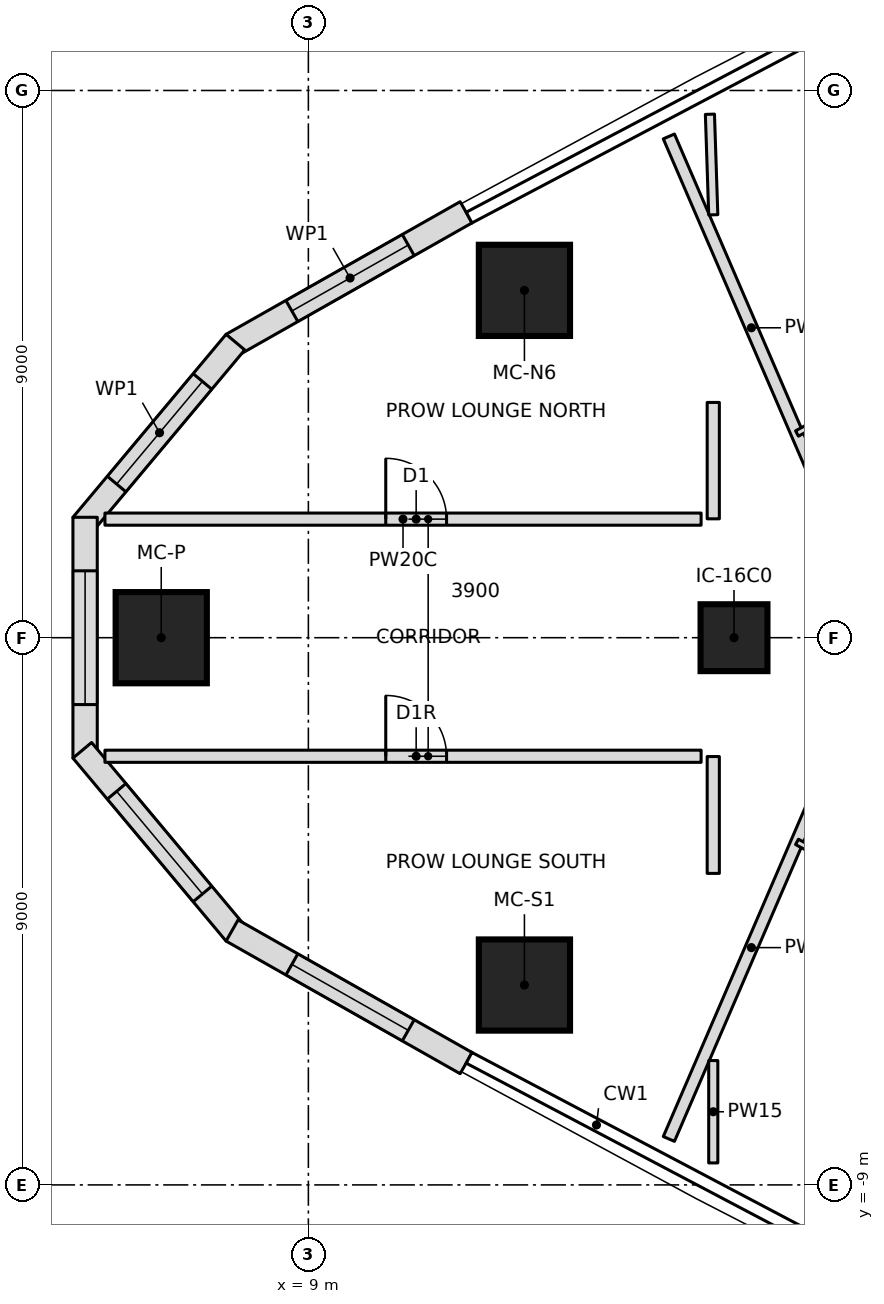
"""IFC4 building model, lengths in metres.
Left out: names, types, materials, properties, quantities, classifications, styles, units other than length and angle.
Written with IfcOpenShell. Run it as: python <this file> out.ifc"""

import sys

from ifc_helpers import new_model, si_unit, direction, frame, frame_2d, origin, origin_2d, place, context, subcontext, project, spatial, polyline, rectangle, outline, extrude, element, fill, save


model = new_model("IFC4")
c1 = context("Model", 3, precision=1e-05, world=origin(), true_north=direction((0.0, 1.0)))
c2 = subcontext(c1, "Body", "Model", "MODEL_VIEW")
j1 = project(units=[si_unit("LENGTHUNIT", "METRE"), si_unit("PLANEANGLEUNIT", "RADIAN")], contexts=[c1])
p1 = place(None, origin())
s1 = spatial("IfcSite", under=j1, at=p1, CompositionType="ELEMENT")
p2 = place(p1, origin())
s2 = spatial("IfcBuilding", under=s1, at=p2, CompositionType="ELEMENT")
p3 = place(p2, frame((0.0, 0.0, 133.75)))
s3 = spatial("IfcBuildingStorey", under=s2, at=p3, CompositionType="ELEMENT", Elevation=133.75)
for number, where, z_axis, x_axis in (
    (1, (6.58, 0.0, 0.0), (0.0, 0.0, 1.0), (1.0, 0.0, 0.0)),
    (2, (12.553, -5.713, 0.0), (0.0, 0.0, 1.0), (1.0, 0.0, 0.0)),
    (3, (12.553, 5.713, 0.0), (0.0, 0.0, 1.0), (1.0, 0.0, 0.0)),
):
    element("IfcColumn", number, at=place(p3, frame(where, z_axis=z_axis, x_axis=x_axis)), inside=s3, PredefinedType="COLUMN", context=c2, shape_type="SweptSolid", body=[
        extrude(rectangle(XDim=1.5, YDim=1.5, at=origin_2d()), origin(), (0.0, 0.0, 1.0), 3.55),
    ])
p4 = place(p3, frame((16.0, 0.0, 0.0), z_axis=(0.0, 0.0, 1.0), x_axis=(1.0, 0.0, 0.0)))
e4 = element("IfcColumn", 4, at=p4, inside=s3, PredefinedType="COLUMN", context=c2, shape_type="SweptSolid", body=[
    extrude(rectangle(XDim=1.1, YDim=1.1, at=origin_2d()), origin(), (0.0, 0.0, 1.0), 3.55),
])
p5 = place(p3, frame((11.594, 6.997, 0.0), z_axis=(0.0, 0.0, 1.0), x_axis=(-0.870045255208, -0.492971859125, 0.0)))
e5 = element("IfcWall", 5, at=p5, inside=s3, PredefinedType="NOTDEFINED", context=c2, shape_type="SweptSolid", body=[
    extrude(outline(polyline([(0.0, -0.2), (4.424, -0.2), (4.352, 0.2), (0.0, 0.2), (0.0, -0.2)])), origin(), (0.0, 0.0, 1.0), 3.25),
])
p6 = place(p5, frame((1.094, 0.0, 0.6)))
e6 = element("IfcOpeningElement", 6, at=p6, cuts=e5, PredefinedType="OPENING", context=c2, shape_type="SweptSolid", body=[
    extrude(outline(polyline([(0.0, 1.35), (0.084, 1.771), (0.322, 2.128), (0.679, 2.366), (1.1, 2.45), (1.521, 2.366), (1.878, 2.128), (2.116, 1.771), (2.2, 1.35), (2.2, 1.1), (2.116, 0.679), (1.878, 0.322), (1.521, 0.084), (1.1, 0.0), (0.679, 0.084), (0.322, 0.322), (0.084, 0.679), (0.0, 1.1), (0.0, 1.35)])), frame((0.0, 0.21, 0.0), z_axis=(0.0, -1.0, 0.0), x_axis=(1.0, 0.0, 0.0)), (0.0, 0.0, 1.0), 0.42),
])
p7 = place(p3, frame((7.777, 4.834, 0.0), z_axis=(0.0, 0.0, 1.0), x_axis=(-0.641787918235, -0.766882173484, 0.0)))
e7 = element("IfcWall", 7, at=p7, inside=s3, PredefinedType="NOTDEFINED", context=c2, shape_type="SweptSolid", body=[
    extrude(outline(polyline([(-0.036, -0.2), (3.888, -0.2), (3.743, 0.2), (0.036, 0.2), (-0.036, -0.2)])), origin(), (0.0, 0.0, 1.0), 3.25),
])
p8 = place(p7, frame((0.808, 0.0, 0.6)))
e8 = element("IfcOpeningElement", 8, at=p8, cuts=e7, PredefinedType="OPENING", context=c2, shape_type="SweptSolid", body=[
    extrude(outline(polyline([(0.0, 1.35), (0.084, 1.771), (0.322, 2.128), (0.679, 2.366), (1.1, 2.45), (1.521, 2.366), (1.878, 2.128), (2.116, 1.771), (2.2, 1.35), (2.2, 1.1), (2.116, 0.679), (1.878, 0.322), (1.521, 0.084), (1.1, 0.0), (0.679, 0.084), (0.322, 0.322), (0.084, 0.679), (0.0, 1.1), (0.0, 1.35)])), frame((0.0, 0.21, 0.0), z_axis=(0.0, -1.0, 0.0), x_axis=(1.0, 0.0, 0.0)), (0.0, 0.0, 1.0), 0.42),
])
p9 = place(p3, frame((5.328, 1.908, 0.0), z_axis=(0.0, 0.0, 1.0), x_axis=(0.0, -1.0, 0.0)))
e9 = element("IfcWall", 9, at=p9, inside=s3, PredefinedType="NOTDEFINED", context=c2, shape_type="SweptSolid", body=[
    extrude(outline(polyline([(-0.073, -0.2), (3.888, -0.2), (3.743, 0.2), (0.073, 0.2), (-0.073, -0.2)])), origin(), (0.0, 0.0, 1.0), 3.25),
])
p10 = place(p9, frame((0.808, 0.0, 0.6)))
e10 = element("IfcOpeningElement", 10, at=p10, cuts=e9, PredefinedType="OPENING", context=c2, shape_type="SweptSolid", body=[
    extrude(outline(polyline([(0.0, 1.35), (0.084, 1.771), (0.322, 2.128), (0.679, 2.366), (1.1, 2.45), (1.521, 2.366), (1.878, 2.128), (2.116, 1.771), (2.2, 1.35), (2.2, 1.1), (2.116, 0.679), (1.878, 0.322), (1.521, 0.084), (1.1, 0.0), (0.679, 0.084), (0.322, 0.322), (0.084, 0.679), (0.0, 1.1), (0.0, 1.35)])), frame((0.0, 0.21, 0.0), z_axis=(0.0, -1.0, 0.0), x_axis=(1.0, 0.0, 0.0)), (0.0, 0.0, 1.0), 0.42),
])
p11 = place(p3, frame((5.328, -1.908, 0.0), z_axis=(0.0, 0.0, 1.0), x_axis=(0.641787918235, -0.766882173484, 0.0)))
e11 = element("IfcWall", 11, at=p11, inside=s3, PredefinedType="NOTDEFINED", context=c2, shape_type="SweptSolid", body=[
    extrude(outline(polyline([(-0.073, -0.2), (3.852, -0.2), (3.779, 0.2), (0.073, 0.2), (-0.073, -0.2)])), origin(), (0.0, 0.0, 1.0), 3.25),
])
p12 = place(p11, frame((0.808, 0.0, 0.6)))
e12 = element("IfcOpeningElement", 12, at=p12, cuts=e11, PredefinedType="OPENING", context=c2, shape_type="SweptSolid", body=[
    extrude(outline(polyline([(0.0, 1.35), (0.084, 1.771), (0.322, 2.128), (0.679, 2.366), (1.1, 2.45), (1.521, 2.366), (1.878, 2.128), (2.116, 1.771), (2.2, 1.35), (2.2, 1.1), (2.116, 0.679), (1.878, 0.322), (1.521, 0.084), (1.1, 0.0), (0.679, 0.084), (0.322, 0.322), (0.084, 0.679), (0.0, 1.1), (0.0, 1.35)])), frame((0.0, 0.21, 0.0), z_axis=(0.0, -1.0, 0.0), x_axis=(1.0, 0.0, 0.0)), (0.0, 0.0, 1.0), 0.42),
])
p13 = place(p3, frame((7.777, -4.834, 0.0), z_axis=(0.0, 0.0, 1.0), x_axis=(0.870045255208, -0.492971859125, 0.0)))
e13 = element("IfcWall", 13, at=p13, inside=s3, PredefinedType="NOTDEFINED", context=c2, shape_type="SweptSolid", body=[
    extrude(outline(polyline([(-0.036, -0.2), (4.388, -0.2), (4.388, 0.2), (0.036, 0.2), (-0.036, -0.2)])), origin(), (0.0, 0.0, 1.0), 3.25),
])
p14 = place(p13, frame((1.094, 0.0, 0.6)))
e14 = element("IfcOpeningElement", 14, at=p14, cuts=e13, PredefinedType="OPENING", context=c2, shape_type="SweptSolid", body=[
    extrude(outline(polyline([(0.0, 1.35), (0.084, 1.771), (0.322, 2.128), (0.679, 2.366), (1.1, 2.45), (1.521, 2.366), (1.878, 2.128), (2.116, 1.771), (2.2, 1.35), (2.2, 1.1), (2.116, 0.679), (1.878, 0.322), (1.521, 0.084), (1.1, 0.0), (0.679, 0.084), (0.322, 0.322), (0.084, 0.679), (0.0, 1.1), (0.0, 1.35)])), frame((0.0, 0.21, 0.0), z_axis=(0.0, -1.0, 0.0), x_axis=(1.0, 0.0, 0.0)), (0.0, 0.0, 1.0), 0.42),
])
p15 = place(p3, frame((5.654, 1.95, 0.0), z_axis=(0.0, 0.0, 1.0), x_axis=(1.0, 0.0, 0.0)))
e15 = element("IfcWall", 15, at=p15, inside=s3, PredefinedType="PARTITIONING", context=c2, shape_type="SweptSolid", body=[
    extrude(rectangle(XDim=9.804, YDim=0.2, at=frame_2d((4.902, 0.0))), origin(), (0.0, 0.0, 1.0), 3.25),
])
p16 = place(p15, frame((4.618, 0.0, 0.0)))
e16 = element("IfcOpeningElement", 16, at=p16, cuts=e15, PredefinedType="OPENING", context=c2, shape_type="SweptSolid", body=[
    extrude(rectangle(XDim=1.0, YDim=2.1, at=frame_2d((0.5, 1.05))), frame((0.0, 0.11, 0.0), z_axis=(0.0, -1.0, 0.0), x_axis=(1.0, 0.0, 0.0)), (0.0, 0.0, 1.0), 0.22),
])
p17 = place(p3, frame((5.654, -1.95, 0.0), z_axis=(0.0, 0.0, 1.0), x_axis=(1.0, 0.0, 0.0)))
e17 = element("IfcWall", 17, at=p17, inside=s3, PredefinedType="PARTITIONING", context=c2, shape_type="SweptSolid", body=[
    extrude(rectangle(XDim=9.804, YDim=0.2, at=frame_2d((4.902, 0.0))), origin(), (0.0, 0.0, 1.0), 3.25),
])
p18 = place(p17, frame((4.618, 0.0, 0.0)))
e18 = element("IfcOpeningElement", 18, at=p18, cuts=e17, PredefinedType="OPENING", context=c2, shape_type="SweptSolid", body=[
    extrude(rectangle(XDim=1.0, YDim=2.1, at=frame_2d((0.5, 1.05))), frame((0.0, 0.11, 0.0), z_axis=(0.0, -1.0, 0.0), x_axis=(1.0, 0.0, 0.0)), (0.0, 0.0, 1.0), 0.22),
])
p19 = place(p3, frame((17.643, 1.95, 0.0), z_axis=(0.0, 0.0, 1.0), x_axis=(-0.395994543879, 0.918252863441, 0.0)))
e19 = element("IfcWall", 19, at=p19, inside=s3, PredefinedType="PARTITIONING", context=c2, shape_type="SweptSolid", body=[
    extrude(rectangle(XDim=6.854, YDim=0.2, at=frame_2d((3.427, 0.0))), origin(), (0.0, 0.0, 1.0), 3.25),
])
p20 = place(p3, frame((17.036, 3.358, 0.0), z_axis=(0.0, 0.0, 1.0), x_axis=(0.879823588489, 0.475300382009, 0.0)))
e20 = element("IfcWall", 20, at=p20, inside=s3, PredefinedType="PARTITIONING", context=c2, shape_type="SweptSolid", body=[
    extrude(rectangle(XDim=1.273, YDim=0.1, at=frame_2d((0.636, 0.0))), origin(), (0.0, 0.0, 1.0), 3.25),
])
p21 = place(p3, frame((14.929, -8.244, 0.0), z_axis=(0.0, 0.0, 1.0), x_axis=(0.395994543879, 0.918252863441, 0.0)))
e21 = element("IfcWall", 21, at=p21, inside=s3, PredefinedType="PARTITIONING", context=c2, shape_type="SweptSolid", body=[
    extrude(rectangle(XDim=6.854, YDim=0.2, at=frame_2d((3.427, 0.0))), origin(), (0.0, 0.0, 1.0), 3.25),
])
p22 = place(p3, frame((18.156, -3.963, 0.0), z_axis=(0.0, 0.0, 1.0), x_axis=(-0.879823588489, 0.475300382009, 0.0)))
e22 = element("IfcWall", 22, at=p22, inside=s3, PredefinedType="PARTITIONING", context=c2, shape_type="SweptSolid", body=[
    extrude(rectangle(XDim=1.273, YDim=0.1, at=frame_2d((0.636, 0.0))), origin(), (0.0, 0.0, 1.0), 3.25),
])
p23 = place(p3, frame((15.604, 8.609, 0.0), z_axis=(0.0, 0.0, 1.0), x_axis=(0.033196927484, -0.999448830109, 0.0)))
e23 = element("IfcWall", 23, at=p23, inside=s3, PredefinedType="PARTITIONING", context=c2, shape_type="SweptSolid", body=[
    extrude(rectangle(XDim=1.655, YDim=0.15, at=frame_2d((0.827, 0.0))), origin(), (0.0, 0.0, 1.0), 3.25),
])
p24 = place(p3, frame((15.659, -6.955, 0.0), z_axis=(0.0, 0.0, 1.0), x_axis=(0.0, -1.0, 0.0)))
e24 = element("IfcWall", 24, at=p24, inside=s3, PredefinedType="PARTITIONING", context=c2, shape_type="SweptSolid", body=[
    extrude(rectangle(XDim=1.684, YDim=0.15, at=frame_2d((0.842, 0.0))), origin(), (0.0, 0.0, 1.0), 3.25),
])
p25 = place(p3, frame((15.659, 3.869, 0.0), z_axis=(0.0, 0.0, 1.0), x_axis=(0.0, -1.0, 0.0)))
e25 = element("IfcWall", 25, at=p25, inside=s3, PredefinedType="PARTITIONING", context=c2, shape_type="SweptSolid", body=[
    extrude(rectangle(XDim=1.914, YDim=0.2, at=frame_2d((0.957, 0.0))), origin(), (0.0, 0.0, 1.0), 3.25),
])
p26 = place(p3, frame((15.659, -1.955, 0.0), z_axis=(0.0, 0.0, 1.0), x_axis=(0.0, -1.0, 0.0)))
e26 = element("IfcWall", 26, at=p26, inside=s3, PredefinedType="PARTITIONING", context=c2, shape_type="SweptSolid", body=[
    extrude(rectangle(XDim=1.922, YDim=0.2, at=frame_2d((0.961, 0.0))), origin(), (0.0, 0.0, 1.0), 3.25),
])
p27 = place(p6, origin())
e27 = element("IfcWindow", 27, at=p27, inside=s3, PartitioningType="SINGLE_PANEL", PredefinedType="WINDOW", context=c2, shape_type="SweptSolid", body=[
    extrude(outline(polyline([(0.0, 1.35), (0.084, 1.771), (0.322, 2.128), (0.679, 2.366), (1.1, 2.45), (1.521, 2.366), (1.878, 2.128), (2.116, 1.771), (2.2, 1.35), (2.2, 1.1), (2.116, 0.679), (1.878, 0.322), (1.521, 0.084), (1.1, 0.0), (0.679, 0.084), (0.322, 0.322), (0.084, 0.679), (0.0, 1.1), (0.0, 1.35)])), frame((0.0, 0.17, 0.0), z_axis=(0.0, -1.0, 0.0), x_axis=(1.0, 0.0, 0.0)), (0.0, 0.0, 1.0), 0.06),
])
fill(e6, e27)
p28 = place(p8, origin())
e28 = element("IfcWindow", 28, at=p28, inside=s3, PartitioningType="SINGLE_PANEL", PredefinedType="WINDOW", context=c2, shape_type="SweptSolid", body=[
    extrude(outline(polyline([(0.0, 1.35), (0.084, 1.771), (0.322, 2.128), (0.679, 2.366), (1.1, 2.45), (1.521, 2.366), (1.878, 2.128), (2.116, 1.771), (2.2, 1.35), (2.2, 1.1), (2.116, 0.679), (1.878, 0.322), (1.521, 0.084), (1.1, 0.0), (0.679, 0.084), (0.322, 0.322), (0.084, 0.679), (0.0, 1.1), (0.0, 1.35)])), frame((0.0, 0.17, 0.0), z_axis=(0.0, -1.0, 0.0), x_axis=(1.0, 0.0, 0.0)), (0.0, 0.0, 1.0), 0.06),
])
fill(e8, e28)
p29 = place(p10, origin())
e29 = element("IfcWindow", 29, at=p29, inside=s3, PartitioningType="SINGLE_PANEL", PredefinedType="WINDOW", context=c2, shape_type="SweptSolid", body=[
    extrude(outline(polyline([(0.0, 1.35), (0.084, 1.771), (0.322, 2.128), (0.679, 2.366), (1.1, 2.45), (1.521, 2.366), (1.878, 2.128), (2.116, 1.771), (2.2, 1.35), (2.2, 1.1), (2.116, 0.679), (1.878, 0.322), (1.521, 0.084), (1.1, 0.0), (0.679, 0.084), (0.322, 0.322), (0.084, 0.679), (0.0, 1.1), (0.0, 1.35)])), frame((0.0, 0.17, 0.0), z_axis=(0.0, -1.0, 0.0), x_axis=(1.0, 0.0, 0.0)), (0.0, 0.0, 1.0), 0.06),
])
fill(e10, e29)
p30 = place(p12, origin())
e30 = element("IfcWindow", 30, at=p30, inside=s3, PartitioningType="SINGLE_PANEL", PredefinedType="WINDOW", context=c2, shape_type="SweptSolid", body=[
    extrude(outline(polyline([(0.0, 1.35), (0.084, 1.771), (0.322, 2.128), (0.679, 2.366), (1.1, 2.45), (1.521, 2.366), (1.878, 2.128), (2.116, 1.771), (2.2, 1.35), (2.2, 1.1), (2.116, 0.679), (1.878, 0.322), (1.521, 0.084), (1.1, 0.0), (0.679, 0.084), (0.322, 0.322), (0.084, 0.679), (0.0, 1.1), (0.0, 1.35)])), frame((0.0, 0.17, 0.0), z_axis=(0.0, -1.0, 0.0), x_axis=(1.0, 0.0, 0.0)), (0.0, 0.0, 1.0), 0.06),
])
fill(e12, e30)
p31 = place(p14, origin())
e31 = element("IfcWindow", 31, at=p31, inside=s3, PartitioningType="SINGLE_PANEL", PredefinedType="WINDOW", context=c2, shape_type="SweptSolid", body=[
    extrude(outline(polyline([(0.0, 1.35), (0.084, 1.771), (0.322, 2.128), (0.679, 2.366), (1.1, 2.45), (1.521, 2.366), (1.878, 2.128), (2.116, 1.771), (2.2, 1.35), (2.2, 1.1), (2.116, 0.679), (1.878, 0.322), (1.521, 0.084), (1.1, 0.0), (0.679, 0.084), (0.322, 0.322), (0.084, 0.679), (0.0, 1.1), (0.0, 1.35)])), frame((0.0, 0.17, 0.0), z_axis=(0.0, -1.0, 0.0), x_axis=(1.0, 0.0, 0.0)), (0.0, 0.0, 1.0), 0.06),
])
fill(e14, e31)
p32 = place(p16, origin())
e32 = element("IfcDoor", 32, at=p32, inside=s3, OperationType="SINGLE_SWING_LEFT", PredefinedType="DOOR", context=c2, shape_type="SweptSolid", body=[
    extrude(rectangle(XDim=1.0, YDim=2.1, at=frame_2d((0.5, 1.05))), frame((0.0, 0.025, 0.0), z_axis=(0.0, -1.0, 0.0), x_axis=(1.0, 0.0, 0.0)), (0.0, 0.0, 1.0), 0.05),
])
fill(e16, e32)
p33 = place(p18, origin())
e33 = element("IfcDoor", 33, at=p33, inside=s3, OperationType="SINGLE_SWING_RIGHT", PredefinedType="DOOR", context=c2, shape_type="SweptSolid", body=[
    extrude(rectangle(XDim=1.0, YDim=2.1, at=frame_2d((0.5, 1.05))), frame((0.0, 0.025, 0.0), z_axis=(0.0, -1.0, 0.0), x_axis=(1.0, 0.0, 0.0)), (0.0, 0.0, 1.0), 0.05),
])
fill(e18, e33)
save(model, sys.argv[1])
